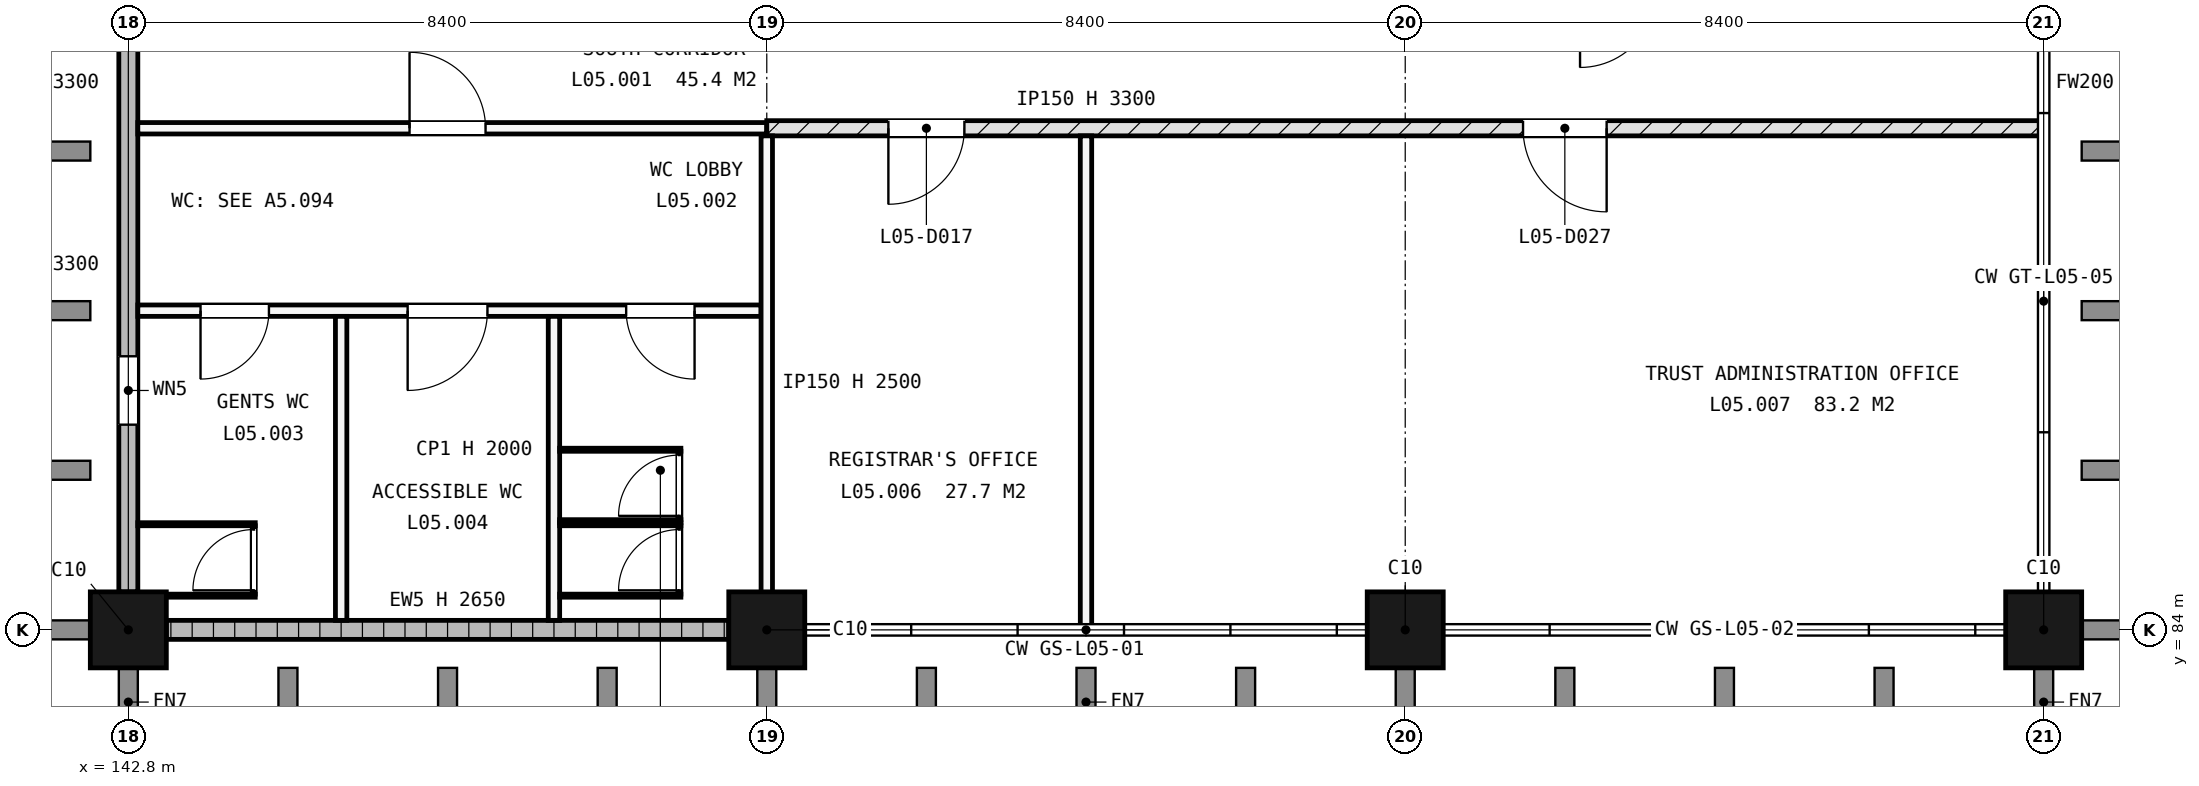
"""IFC4 building model, lengths in metres.
Left out: names, types, materials, properties, quantities, classifications, styles, units other than length and angle.
Written with IfcOpenShell. Run it as: python <this file> out.ifc"""

import sys

from ifc_helpers import new_model, si_unit, direction, frame, frame_2d, origin, origin_2d, place, context, subcontext, project, spatial, rectangle, extrude, element, fill, save


model = new_model("IFC4")
c1 = context("Model", 3, precision=1e-05, world=origin(), true_north=direction((0.0, 1.0)))
c2 = subcontext(c1, "Body", "Model", "MODEL_VIEW")
j1 = project(units=[si_unit("LENGTHUNIT", "METRE"), si_unit("PLANEANGLEUNIT", "RADIAN")], contexts=[c1])
p1 = place(None, origin())
s1 = spatial("IfcSite", under=j1, at=p1, CompositionType="ELEMENT")
p2 = place(p1, origin())
s2 = spatial("IfcBuilding", under=s1, at=p2, CompositionType="ELEMENT")
p3 = place(p2, frame((0.0, 0.0, 21.6)))
s3 = spatial("IfcBuildingStorey", under=s2, at=p3, CompositionType="ELEMENT", Elevation=21.6)
for number, where, z_axis, x_axis in (
    (1, (142.8, 84.0, -0.25), (0.0, 0.0, 1.0), (1.0, 0.0, 0.0)),
    (2, (151.2, 84.0, -0.25), (0.0, 0.0, 1.0), (1.0, 0.0, 0.0)),
    (3, (159.6, 84.0, -0.25), (0.0, 0.0, 1.0), (1.0, 0.0, 0.0)),
    (4, (168.0, 84.0, -0.25), (0.0, 0.0, 1.0), (1.0, 0.0, 0.0)),
):
    element("IfcColumn", number, at=place(p3, frame(where, z_axis=z_axis, x_axis=x_axis)), inside=s3, PredefinedType="COLUMN", context=c2, shape_type="SweptSolid", body=[
        extrude(rectangle(XDim=1.0, YDim=1.0, at=origin_2d()), origin(), (0.0, 0.0, 1.0), 3.6),
    ])
p4 = place(p3, frame((143.3, 84.0, 0.0), z_axis=(0.0, 0.0, 1.0), x_axis=(1.0, 0.0, 0.0)))
e5 = element("IfcWall", 5, at=p4, inside=s3, PredefinedType="STANDARD", context=c2, shape_type="SweptSolid", body=[
    extrude(rectangle(XDim=7.4, YDim=0.25, at=frame_2d((3.7, 0.0))), origin(), (0.0, 0.0, 1.0), 2.65),
])
p5 = place(p3, frame((142.8, 84.5, 0.0), z_axis=(0.0, 0.0, 1.0), x_axis=(0.0, 1.0, 0.0)))
e6 = element("IfcWall", 6, at=p5, inside=s3, PredefinedType="STANDARD", context=c2, shape_type="SweptSolid", body=[
    extrude(rectangle(XDim=7.675, YDim=0.25, at=frame_2d((3.837, 0.0))), origin(), (0.0, 0.0, 1.0), 3.3),
])
p6 = place(p5, frame((2.2, 0.0, 2.1)))
e7 = element("IfcOpeningElement", 7, at=p6, cuts=e6, PredefinedType="OPENING", context=c2, shape_type="SweptSolid", body=[
    extrude(rectangle(XDim=0.9, YDim=0.6, at=frame_2d((0.45, 0.3))), frame((0.0, 0.135, 0.0), z_axis=(0.0, -1.0, 0.0), x_axis=(1.0, 0.0, 0.0)), (0.0, 0.0, 1.0), 0.27),
])
p7 = place(p3, frame((142.925, 88.2, 0.0), z_axis=(0.0, 0.0, 1.0), x_axis=(1.0, 0.0, 0.0)))
e8 = element("IfcWall", 8, at=p7, inside=s3, PredefinedType="PARTITIONING", context=c2, shape_type="SweptSolid", body=[
    extrude(rectangle(XDim=8.2, YDim=0.15, at=frame_2d((4.1, 0.0))), origin(), (0.0, 0.0, 1.0), 3.3),
])
p8 = place(p7, frame((0.825, 0.0, 0.0)))
e9 = element("IfcOpeningElement", 9, at=p8, cuts=e8, PredefinedType="OPENING", context=c2, shape_type="SweptSolid", body=[
    extrude(rectangle(XDim=0.9, YDim=2.1, at=frame_2d((0.45, 1.05))), frame((0.0, 0.085, 0.0), z_axis=(0.0, -1.0, 0.0), x_axis=(1.0, 0.0, 0.0)), (0.0, 0.0, 1.0), 0.17),
])
p9 = place(p7, frame((3.55, 0.0, 0.0)))
e10 = element("IfcOpeningElement", 10, at=p9, cuts=e8, PredefinedType="OPENING", context=c2, shape_type="SweptSolid", body=[
    extrude(rectangle(XDim=1.05, YDim=2.25, at=frame_2d((0.525, 1.125))), frame((0.0, 0.085, 0.0), z_axis=(0.0, -1.0, 0.0), x_axis=(1.0, 0.0, 0.0)), (0.0, 0.0, 1.0), 0.17),
])
p10 = place(p7, frame((6.425, 0.0, 0.0)))
e11 = element("IfcOpeningElement", 11, at=p10, cuts=e8, PredefinedType="OPENING", context=c2, shape_type="SweptSolid", body=[
    extrude(rectangle(XDim=0.9, YDim=2.1, at=frame_2d((0.45, 1.05))), frame((0.0, 0.085, 0.0), z_axis=(0.0, -1.0, 0.0), x_axis=(1.0, 0.0, 0.0)), (0.0, 0.0, 1.0), 0.17),
])
p11 = place(p3, frame((142.925, 90.6, 0.0), z_axis=(0.0, 0.0, 1.0), x_axis=(1.0, 0.0, 0.0)))
e12 = element("IfcWall", 12, at=p11, inside=s3, PredefinedType="PARTITIONING", context=c2, shape_type="SweptSolid", body=[
    extrude(rectangle(XDim=8.275, YDim=0.15, at=frame_2d((4.137, 0.0))), origin(), (0.0, 0.0, 1.0), 3.3),
])
p12 = place(p11, frame((3.575, 0.0, 0.0)))
e13 = element("IfcOpeningElement", 13, at=p12, cuts=e12, PredefinedType="OPENING", context=c2, shape_type="SweptSolid", body=[
    extrude(rectangle(XDim=1.0, YDim=2.1, at=frame_2d((0.5, 1.05))), frame((0.0, 0.085, 0.0), z_axis=(0.0, -1.0, 0.0), x_axis=(1.0, 0.0, 0.0)), (0.0, 0.0, 1.0), 0.17),
])
p13 = place(p3, frame((151.2, 90.6, 0.0), z_axis=(0.0, 0.0, 1.0), x_axis=(1.0, 0.0, 0.0)))
e14 = element("IfcWall", 14, at=p13, inside=s3, PredefinedType="SOLIDWALL", context=c2, shape_type="SweptSolid", body=[
    extrude(rectangle(XDim=16.8, YDim=0.2, at=frame_2d((8.4, 0.0))), origin(), (0.0, 0.0, 1.0), 3.3),
])
p14 = place(p13, frame((1.6, 0.0, 0.0)))
e15 = element("IfcOpeningElement", 15, at=p14, cuts=e14, PredefinedType="OPENING", context=c2, shape_type="SweptSolid", body=[
    extrude(rectangle(XDim=1.0, YDim=2.1, at=frame_2d((0.5, 1.05))), frame((0.0, 0.11, 0.0), z_axis=(0.0, -1.0, 0.0), x_axis=(1.0, 0.0, 0.0)), (0.0, 0.0, 1.0), 0.22),
])
p15 = place(p13, frame((9.95, 0.0, 0.0)))
e16 = element("IfcOpeningElement", 16, at=p15, cuts=e14, PredefinedType="OPENING", context=c2, shape_type="SweptSolid", body=[
    extrude(rectangle(XDim=1.1, YDim=2.25, at=frame_2d((0.55, 1.125))), frame((0.0, 0.11, 0.0), z_axis=(0.0, -1.0, 0.0), x_axis=(1.0, 0.0, 0.0)), (0.0, 0.0, 1.0), 0.22),
])
for number, where, z_axis, x_axis in (
    (17, (145.6, 84.125, 0.0), (0.0, 0.0, 1.0), (0.0, 1.0, 0.0)),
    (18, (148.4, 84.125, 0.0), (0.0, 0.0, 1.0), (0.0, 1.0, 0.0)),
):
    element("IfcWall", number, at=place(p3, frame(where, z_axis=z_axis, x_axis=x_axis)), inside=s3, PredefinedType="PARTITIONING", context=c2, shape_type="SweptSolid", body=[
        extrude(rectangle(XDim=4.0, YDim=0.15, at=frame_2d((2.0, 0.0))), origin(), (0.0, 0.0, 1.0), 3.3),
    ])
p16 = place(p3, frame((151.2, 84.0, 0.0), z_axis=(0.0, 0.0, 1.0), x_axis=(0.0, 1.0, 0.0)))
e19 = element("IfcWall", 19, at=p16, inside=s3, PredefinedType="PARTITIONING", context=c2, shape_type="SweptSolid", body=[
    extrude(rectangle(XDim=6.5, YDim=0.15, at=frame_2d((3.25, 0.0))), origin(), (0.0, 0.0, 1.0), 2.5),
])
p17 = place(p3, frame((155.4, 84.0, 0.0), z_axis=(0.0, 0.0, 1.0), x_axis=(0.0, 1.0, 0.0)))
e20 = element("IfcWall", 20, at=p17, inside=s3, PredefinedType="PARTITIONING", context=c2, shape_type="SweptSolid", body=[
    extrude(rectangle(XDim=6.5, YDim=0.15, at=frame_2d((3.25, 0.0))), origin(), (0.0, 0.0, 1.0), 3.3),
])
p18 = place(p3, frame((142.93, 84.45, 0.0), z_axis=(0.0, 0.0, 1.0), x_axis=(1.0, 0.0, 0.0)))
e21 = element("IfcWall", 21, at=p18, inside=s3, PredefinedType="PARTITIONING", context=c2, shape_type="SweptSolid", body=[
    extrude(rectangle(XDim=1.54, YDim=0.04, at=frame_2d((0.77, 0.0))), origin(), (0.0, 0.0, 1.0), 2.0),
])
p19 = place(p3, frame((142.925, 85.39, 0.0), z_axis=(0.0, 0.0, 1.0), x_axis=(1.0, 0.0, 0.0)))
e22 = element("IfcWall", 22, at=p19, inside=s3, PredefinedType="PARTITIONING", context=c2, shape_type="SweptSolid", body=[
    extrude(rectangle(XDim=1.545, YDim=0.04, at=frame_2d((0.772, 0.0))), origin(), (0.0, 0.0, 1.0), 2.0),
])
p20 = place(p3, frame((144.45, 84.47, 0.0), z_axis=(0.0, 0.0, 1.0), x_axis=(0.0, 1.0, 0.0)))
e23 = element("IfcWall", 23, at=p20, inside=s3, PredefinedType="PARTITIONING", context=c2, shape_type="SweptSolid", body=[
    extrude(rectangle(XDim=0.9, YDim=0.04, at=frame_2d((0.45, 0.0))), origin(), (0.0, 0.0, 1.0), 2.0),
])
p21 = place(p20, frame((0.05, 0.0, 0.0)))
e24 = element("IfcOpeningElement", 24, at=p21, cuts=e23, PredefinedType="OPENING", context=c2, shape_type="SweptSolid", body=[
    extrude(rectangle(XDim=0.8, YDim=2.0, at=frame_2d((0.4, 1.0))), frame((0.0, 0.03, 0.0), z_axis=(0.0, -1.0, 0.0), x_axis=(1.0, 0.0, 0.0)), (0.0, 0.0, 1.0), 0.06),
])
for number, where, z_axis, x_axis in (
    (25, (148.475, 84.45, 0.0), (0.0, 0.0, 1.0), (1.0, 0.0, 0.0)),
    (26, (148.475, 85.39, 0.0), (0.0, 0.0, 1.0), (1.0, 0.0, 0.0)),
):
    element("IfcWall", number, at=place(p3, frame(where, z_axis=z_axis, x_axis=x_axis)), inside=s3, PredefinedType="PARTITIONING", context=c2, shape_type="SweptSolid", body=[
        extrude(rectangle(XDim=1.595, YDim=0.04, at=frame_2d((0.797, 0.0))), origin(), (0.0, 0.0, 1.0), 2.0),
    ])
p22 = place(p3, frame((150.05, 84.47, 0.0), z_axis=(0.0, 0.0, 1.0), x_axis=(0.0, 1.0, 0.0)))
e27 = element("IfcWall", 27, at=p22, inside=s3, PredefinedType="PARTITIONING", context=c2, shape_type="SweptSolid", body=[
    extrude(rectangle(XDim=0.9, YDim=0.04, at=frame_2d((0.45, 0.0))), origin(), (0.0, 0.0, 1.0), 2.0),
])
p23 = place(p22, frame((0.05, 0.0, 0.0)))
e28 = element("IfcOpeningElement", 28, at=p23, cuts=e27, PredefinedType="OPENING", context=c2, shape_type="SweptSolid", body=[
    extrude(rectangle(XDim=0.8, YDim=2.0, at=frame_2d((0.4, 1.0))), frame((0.0, 0.03, 0.0), z_axis=(0.0, -1.0, 0.0), x_axis=(1.0, 0.0, 0.0)), (0.0, 0.0, 1.0), 0.06),
])
for number, where, z_axis, x_axis in (
    (29, (148.475, 85.43, 0.0), (0.0, 0.0, 1.0), (1.0, 0.0, 0.0)),
    (30, (148.475, 86.37, 0.0), (0.0, 0.0, 1.0), (1.0, 0.0, 0.0)),
):
    element("IfcWall", number, at=place(p3, frame(where, z_axis=z_axis, x_axis=x_axis)), inside=s3, PredefinedType="PARTITIONING", context=c2, shape_type="SweptSolid", body=[
        extrude(rectangle(XDim=1.595, YDim=0.04, at=frame_2d((0.797, 0.0))), origin(), (0.0, 0.0, 1.0), 2.0),
    ])
p24 = place(p3, frame((150.05, 85.45, 0.0), z_axis=(0.0, 0.0, 1.0), x_axis=(0.0, 1.0, 0.0)))
e31 = element("IfcWall", 31, at=p24, inside=s3, PredefinedType="PARTITIONING", context=c2, shape_type="SweptSolid", body=[
    extrude(rectangle(XDim=0.9, YDim=0.04, at=frame_2d((0.45, 0.0))), origin(), (0.0, 0.0, 1.0), 2.0),
])
p25 = place(p24, frame((0.05, 0.0, 0.0)))
e32 = element("IfcOpeningElement", 32, at=p25, cuts=e31, PredefinedType="OPENING", context=c2, shape_type="SweptSolid", body=[
    extrude(rectangle(XDim=0.8, YDim=2.0, at=frame_2d((0.4, 1.0))), frame((0.0, 0.03, 0.0), z_axis=(0.0, -1.0, 0.0), x_axis=(1.0, 0.0, 0.0)), (0.0, 0.0, 1.0), 0.06),
])
p26 = place(p6, origin())
e33 = element("IfcWindow", 33, at=p26, inside=s3, PartitioningType="SINGLE_PANEL", PredefinedType="WINDOW", context=c2, shape_type="SweptSolid", body=[
    extrude(rectangle(XDim=0.9, YDim=0.6, at=frame_2d((0.45, 0.3))), frame((0.0, 0.03, 0.0), z_axis=(0.0, -1.0, 0.0), x_axis=(1.0, 0.0, 0.0)), (0.0, 0.0, 1.0), 0.06),
])
fill(e7, e33)
p27 = place(p8, origin())
e34 = element("IfcDoor", 34, at=p27, inside=s3, OperationType="SINGLE_SWING_LEFT", PredefinedType="DOOR", context=c2, shape_type="SweptSolid", body=[
    extrude(rectangle(XDim=0.9, YDim=2.1, at=frame_2d((0.45, 1.05))), frame((0.0, 0.025, 0.0), z_axis=(0.0, -1.0, 0.0), x_axis=(1.0, 0.0, 0.0)), (0.0, 0.0, 1.0), 0.05),
])
fill(e9, e34)
p28 = place(p9, origin())
e35 = element("IfcDoor", 35, at=p28, inside=s3, OperationType="SINGLE_SWING_LEFT", PredefinedType="DOOR", context=c2, shape_type="SweptSolid", body=[
    extrude(rectangle(XDim=1.05, YDim=2.25, at=frame_2d((0.525, 1.125))), frame((0.0, 0.025, 0.0), z_axis=(0.0, -1.0, 0.0), x_axis=(1.0, 0.0, 0.0)), (0.0, 0.0, 1.0), 0.05),
])
fill(e10, e35)
p29 = place(p10, origin())
e36 = element("IfcDoor", 36, at=p29, inside=s3, OperationType="SINGLE_SWING_RIGHT", PredefinedType="DOOR", context=c2, shape_type="SweptSolid", body=[
    extrude(rectangle(XDim=0.9, YDim=2.1, at=frame_2d((0.45, 1.05))), frame((0.0, 0.025, 0.0), z_axis=(0.0, -1.0, 0.0), x_axis=(1.0, 0.0, 0.0)), (0.0, 0.0, 1.0), 0.05),
])
fill(e11, e36)
p30 = place(p14, origin())
e37 = element("IfcDoor", 37, at=p30, inside=s3, OperationType="SINGLE_SWING_LEFT", PredefinedType="DOOR", context=c2, shape_type="SweptSolid", body=[
    extrude(rectangle(XDim=1.0, YDim=2.1, at=frame_2d((0.5, 1.05))), frame((0.0, 0.025, 0.0), z_axis=(0.0, -1.0, 0.0), x_axis=(1.0, 0.0, 0.0)), (0.0, 0.0, 1.0), 0.05),
])
fill(e15, e37)
p31 = place(p15, origin())
e38 = element("IfcDoor", 38, at=p31, inside=s3, OperationType="SINGLE_SWING_RIGHT", PredefinedType="DOOR", context=c2, shape_type="SweptSolid", body=[
    extrude(rectangle(XDim=1.1, YDim=2.25, at=frame_2d((0.55, 1.125))), frame((0.0, 0.025, 0.0), z_axis=(0.0, -1.0, 0.0), x_axis=(1.0, 0.0, 0.0)), (0.0, 0.0, 1.0), 0.05),
])
fill(e16, e38)
p32 = place(p12, origin())
e39 = element("IfcDoor", 39, at=p32, inside=s3, OperationType="SINGLE_SWING_RIGHT", PredefinedType="DOOR", context=c2, shape_type="SweptSolid", body=[
    extrude(rectangle(XDim=1.0, YDim=2.1, at=frame_2d((0.5, 1.05))), frame((0.0, 0.025, 0.0), z_axis=(0.0, -1.0, 0.0), x_axis=(1.0, 0.0, 0.0)), (0.0, 0.0, 1.0), 0.05),
])
fill(e13, e39)
p33 = place(p21, origin())
e40 = element("IfcDoor", 40, at=p33, inside=s3, OperationType="SINGLE_SWING_LEFT", PredefinedType="DOOR", context=c2, shape_type="SweptSolid", body=[
    extrude(rectangle(XDim=0.8, YDim=2.0, at=frame_2d((0.4, 1.0))), frame((0.0, 0.02, 0.0), z_axis=(0.0, -1.0, 0.0), x_axis=(1.0, 0.0, 0.0)), (0.0, 0.0, 1.0), 0.04),
])
fill(e24, e40)
p34 = place(p23, origin())
e41 = element("IfcDoor", 41, at=p34, inside=s3, OperationType="SINGLE_SWING_LEFT", PredefinedType="DOOR", context=c2, shape_type="SweptSolid", body=[
    extrude(rectangle(XDim=0.8, YDim=2.0, at=frame_2d((0.4, 1.0))), frame((0.0, 0.02, 0.0), z_axis=(0.0, -1.0, 0.0), x_axis=(1.0, 0.0, 0.0)), (0.0, 0.0, 1.0), 0.04),
])
fill(e28, e41)
p35 = place(p25, origin())
e42 = element("IfcDoor", 42, at=p35, inside=s3, OperationType="SINGLE_SWING_LEFT", PredefinedType="DOOR", context=c2, shape_type="SweptSolid", body=[
    extrude(rectangle(XDim=0.8, YDim=2.0, at=frame_2d((0.4, 1.0))), frame((0.0, 0.02, 0.0), z_axis=(0.0, -1.0, 0.0), x_axis=(1.0, 0.0, 0.0)), (0.0, 0.0, 1.0), 0.04),
])
fill(e32, e42)
save(model, sys.argv[1])
